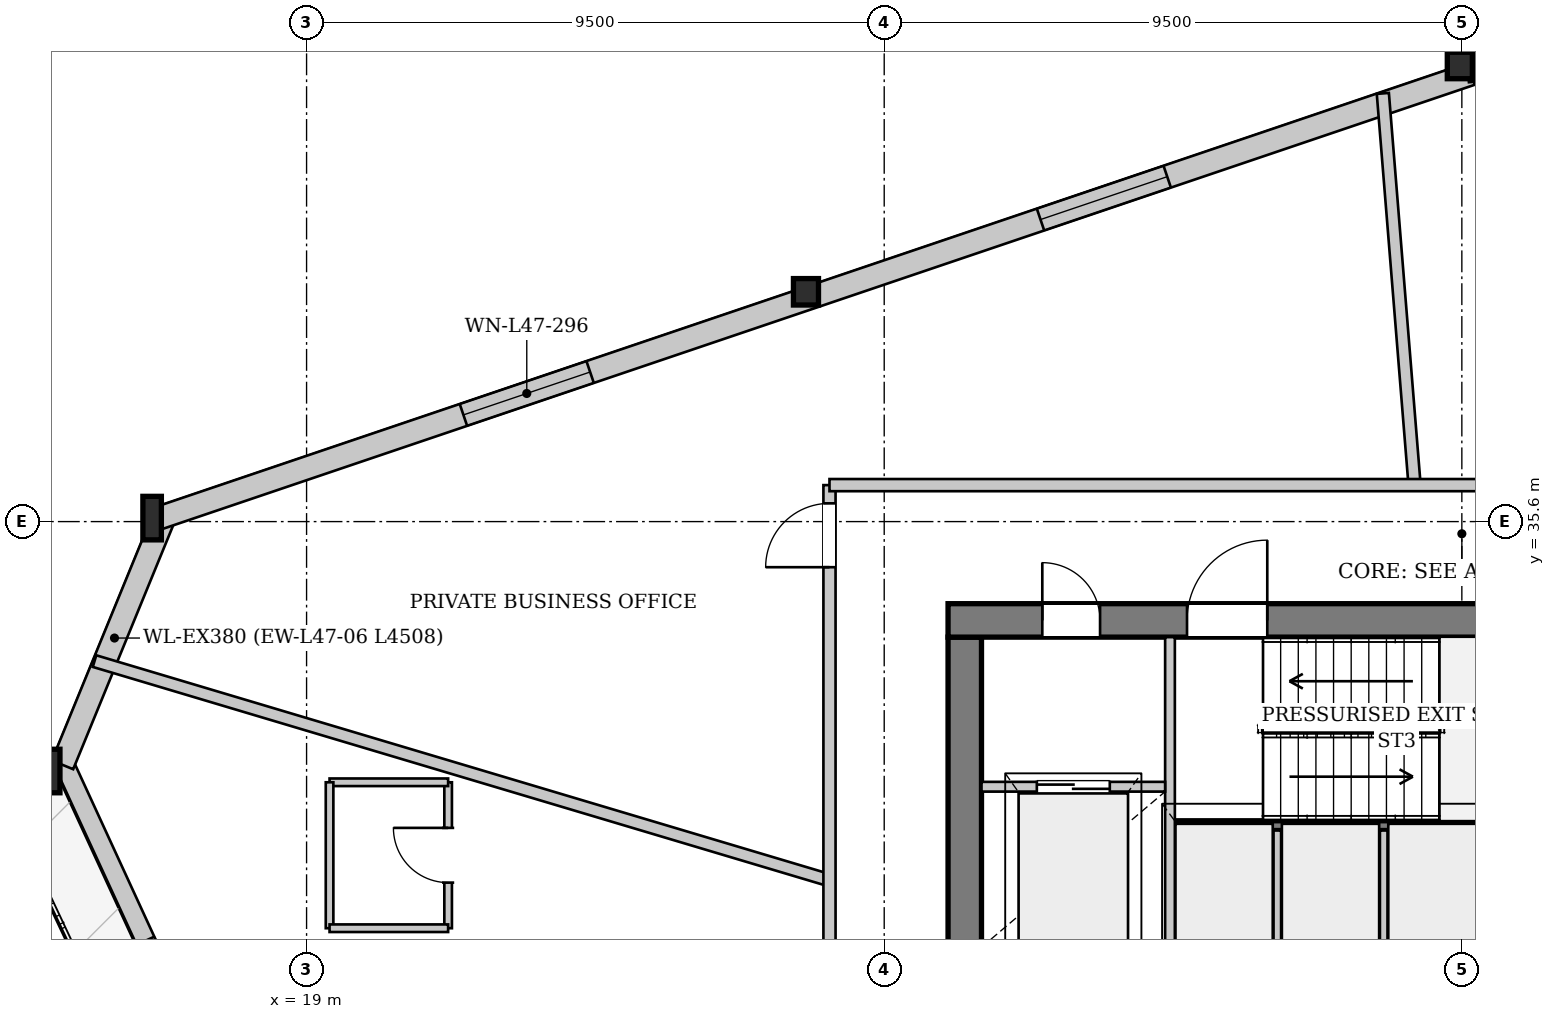
"""IFC4 building model, lengths in metres.
Left out: names, types, materials, properties, quantities, classifications, styles, units other than length and angle.
Written with IfcOpenShell. Run it as: python <this file> out.ifc"""

import sys

from ifc_helpers import new_model, si_unit, direction, frame, frame_2d, origin, origin_2d, place, context, subcontext, project, spatial, rectangle, i_section, extrude, source, transform, mapped, element, fill, save


model = new_model("IFC4")
c1 = context("Model", 3, precision=1e-05, world=origin(), true_north=direction((0.0, 1.0)))
c2 = subcontext(c1, "Body", "Model", "MODEL_VIEW")
j1 = project(units=[si_unit("LENGTHUNIT", "METRE"), si_unit("PLANEANGLEUNIT", "RADIAN")], contexts=[c1])
p1 = place(None, origin())
s1 = spatial("IfcSite", under=j1, at=p1, CompositionType="ELEMENT")
p2 = place(p1, origin())
s2 = spatial("IfcBuilding", under=s1, at=p2, CompositionType="ELEMENT")
p3 = place(p2, frame((0.0, 0.0, 178.55)))
s3 = spatial("IfcBuildingStorey", under=s2, at=p3, CompositionType="ELEMENT", Elevation=178.55)
m1 = source(origin(), c2, "Body", "SweptSolid", [
    extrude(i_section(OverallWidth=0.412, OverallDepth=0.435, WebThickness=0.031, FlangeThickness=0.05, at=origin_2d()), origin(), (0.0, 0.0, 1.0), 3.395),
])
p4 = place(p3, frame((38.092, 43.144, 0.0), z_axis=(-0.07370194171, -0.025526038348, 0.996953582247), x_axis=(0.327268874933, -0.944931258611, 0.0)))
e1 = element("IfcColumn", 1, at=p4, inside=s3, PredefinedType="COLUMN", context=c2, shape_type="MappedRepresentation", body=[
    mapped(m1, transform((0.0, 0.0, 0.0), x_axis=(1.0, 0.0, 0.0), y_axis=(0.0, 1.0, 0.0), z_axis=(0.0, 0.0, 1.0), scale=1.0)),
])
m2 = source(origin(), c2, "Body", "SweptSolid", [
    extrude(i_section(OverallWidth=0.412, OverallDepth=0.435, WebThickness=0.031, FlangeThickness=0.05, at=origin_2d()), origin(), (0.0, 0.0, 1.0), 3.398),
])
p5 = place(p3, frame((27.306, 39.493, 0.0), z_axis=(-0.054536558133, -0.067254569714, 0.996244240475), x_axis=(0.776722832327, -0.629842553137, 0.0)))
e2 = element("IfcColumn", 2, at=p5, inside=s3, PredefinedType="COLUMN", context=c2, shape_type="MappedRepresentation", body=[
    mapped(m2, transform((0.0, 0.0, 0.0), x_axis=(1.0, 0.0, 0.0), y_axis=(0.0, 1.0, 0.0), z_axis=(0.0, 0.0, 1.0), scale=1.0)),
])
m3 = source(origin(), c2, "Body", "SweptSolid", [
    extrude(i_section(OverallWidth=0.304, OverallDepth=0.716, WebThickness=0.021, FlangeThickness=0.04, at=origin_2d()), origin(), (0.0, 0.0, 1.0), 3.407),
])
p6 = place(p3, frame((16.52, 35.843, 0.0), z_axis=(-0.035467286083, -0.108694692905, 0.993442265737), x_axis=(0.950669589838, -0.310205304528, 0.0)))
e3 = element("IfcColumn", 3, at=p6, inside=s3, PredefinedType="COLUMN", context=c2, shape_type="MappedRepresentation", body=[
    mapped(m3, transform((0.0, 0.0, 0.0), x_axis=(1.0, 0.0, 0.0), y_axis=(0.0, 1.0, 0.0), z_axis=(0.0, 0.0, 1.0), scale=1.0)),
])
m4 = source(origin(), c2, "Body", "SweptSolid", [
    extrude(i_section(OverallWidth=0.304, OverallDepth=0.716, WebThickness=0.021, FlangeThickness=0.04, at=origin_2d()), origin(), (0.0, 0.0, 1.0), 3.403),
])
p7 = place(p3, frame((14.81, 31.672, 0.0), z_axis=(-0.010402853053, -0.102019703729, 0.994727983269), x_axis=(0.994841349494, -0.101443034934, 0.0)))
e4 = element("IfcColumn", 4, at=p7, inside=s3, PredefinedType="COLUMN", context=c2, shape_type="MappedRepresentation", body=[
    mapped(m4, transform((0.0, 0.0, 0.0), x_axis=(1.0, 0.0, 0.0), y_axis=(0.0, 1.0, 0.0), z_axis=(0.0, 0.0, 1.0), scale=1.0)),
])
p8 = place(p3, frame((22.411, 15.536, 0.0), z_axis=(0.0, 0.0, 1.0), x_axis=(-0.418042306269, 0.90842755912, 0.0)))
e5 = element("IfcWall", 5, at=p8, inside=s3, PredefinedType="SOLIDWALL", context=c2, shape_type="SweptSolid", body=[
    extrude(rectangle(XDim=17.836, YDim=0.32, at=frame_2d((8.918, 0.0))), origin(), (0.0, 0.0, 1.0), 2.722),
])
p9 = place(p8, frame((5.707, 0.0, 0.0)))
e6 = element("IfcOpeningElement", 6, at=p9, cuts=e5, PredefinedType="OPENING", context=c2, shape_type="SweptSolid", body=[
    extrude(rectangle(XDim=1.5, YDim=2.3, at=frame_2d((0.75, 1.15))), frame((0.0, 0.17, 0.0), z_axis=(0.0, -1.0, 0.0), x_axis=(1.0, 0.0, 0.0)), (0.0, 0.0, 1.0), 0.34),
])
p10 = place(p8, frame((11.898, 0.0, 0.252)))
e7 = element("IfcOpeningElement", 7, at=p10, cuts=e5, PredefinedType="OPENING", context=c2, shape_type="SweptSolid", body=[
    extrude(rectangle(XDim=2.6, YDim=2.35, at=frame_2d((1.3, 1.175))), frame((0.0, 0.17, 0.0), z_axis=(0.0, -1.0, 0.0), x_axis=(1.0, 0.0, 0.0)), (0.0, 0.0, 1.0), 0.34),
])
p11 = place(p3, frame((14.986, 31.6, 0.0), z_axis=(0.0, 0.0, 1.0), x_axis=(0.379425607081, 0.925222248269, 0.0)))
e8 = element("IfcWall", 8, at=p11, inside=s3, PredefinedType="SOLIDWALL", context=c2, shape_type="SweptSolid", body=[
    extrude(rectangle(XDim=4.508, YDim=0.38, at=frame_2d((2.254, 0.0))), origin(), (0.0, 0.0, 1.0), 2.722),
])
p12 = place(p3, frame((16.581, 35.663, 0.0), z_axis=(0.0, 0.0, 1.0), x_axis=(0.947210910962, 0.320611119822, 0.0)))
e9 = element("IfcWall", 9, at=p12, inside=s3, PredefinedType="SOLIDWALL", context=c2, shape_type="SweptSolid", body=[
    extrude(rectangle(XDim=22.774, YDim=0.38, at=frame_2d((11.387, 0.0))), origin(), (0.0, 0.0, 1.0), 2.722),
])
p13 = place(p12, frame((5.277, 0.0, 0.352)))
e10 = element("IfcOpeningElement", 10, at=p13, cuts=e9, PredefinedType="OPENING", context=c2, shape_type="SweptSolid", body=[
    extrude(rectangle(XDim=2.2, YDim=2.25, at=frame_2d((1.1, 1.125))), frame((0.0, 0.2, 0.0), z_axis=(0.0, -1.0, 0.0), x_axis=(1.0, 0.0, 0.0)), (0.0, 0.0, 1.0), 0.4),
])
p14 = place(p12, frame((15.297, 0.0, 0.352)))
e11 = element("IfcOpeningElement", 11, at=p14, cuts=e9, PredefinedType="OPENING", context=c2, shape_type="SweptSolid", body=[
    extrude(rectangle(XDim=2.2, YDim=2.25, at=frame_2d((1.1, 1.125))), frame((0.0, 0.2, 0.0), z_axis=(0.0, -1.0, 0.0), x_axis=(1.0, 0.0, 0.0)), (0.0, 0.0, 1.0), 0.4),
])
p15 = place(p3, frame((38.104, 42.985, 0.0), z_axis=(0.0, 0.0, 1.0), x_axis=(0.997043186839, 0.076843240291, 0.0)))
e12 = element("IfcWall", 12, at=p15, inside=s3, PredefinedType="SOLIDWALL", context=c2, shape_type="SweptSolid", body=[
    extrude(rectangle(XDim=22.774, YDim=0.32, at=frame_2d((11.387, 0.0))), origin(), (0.0, 0.0, 1.0), 2.722),
])
p16 = place(p15, frame((6.538, 0.0, 0.0)))
e13 = element("IfcOpeningElement", 13, at=p16, cuts=e12, PredefinedType="OPENING", context=c2, shape_type="SweptSolid", body=[
    extrude(rectangle(XDim=1.5, YDim=2.3, at=frame_2d((0.75, 1.15))), frame((0.0, 0.17, 0.0), z_axis=(0.0, -1.0, 0.0), x_axis=(1.0, 0.0, 0.0)), (0.0, 0.0, 1.0), 0.34),
])
p17 = place(p15, frame((15.553, 0.0, 0.252)))
e14 = element("IfcOpeningElement", 14, at=p17, cuts=e12, PredefinedType="OPENING", context=c2, shape_type="SweptSolid", body=[
    extrude(rectangle(XDim=2.6, YDim=2.35, at=frame_2d((1.3, 1.175))), frame((0.0, 0.17, 0.0), z_axis=(0.0, -1.0, 0.0), x_axis=(1.0, 0.0, 0.0)), (0.0, 0.0, 1.0), 0.34),
])
p18 = place(p3, frame((29.825, 19.5, 0.0), z_axis=(0.0, 0.0, 1.0), x_axis=(0.0, 1.0, 0.0)))
e15 = element("IfcWall", 15, at=p18, inside=s3, PredefinedType="SHEAR", context=c2, shape_type="SweptSolid", body=[
    extrude(rectangle(XDim=14.2, YDim=0.55, at=frame_2d((7.1, 0.0))), origin(), (0.0, 0.0, 1.0), 3.33),
])
p19 = place(p18, frame((7.42, 0.0, 0.0)))
e16 = element("IfcOpeningElement", 16, at=p19, cuts=e15, PredefinedType="OPENING", context=c2, shape_type="SweptSolid", body=[
    extrude(rectangle(XDim=1.6, YDim=2.2, at=frame_2d((0.8, 1.1))), frame((0.0, 0.285, 0.0), z_axis=(0.0, -1.0, 0.0), x_axis=(1.0, 0.0, 0.0)), (0.0, 0.0, 1.0), 0.57),
])
p20 = place(p3, frame((29.55, 33.975, 0.0), z_axis=(0.0, 0.0, 1.0), x_axis=(1.0, 0.0, 0.0)))
e17 = element("IfcWall", 17, at=p20, inside=s3, PredefinedType="SHEAR", context=c2, shape_type="SweptSolid", body=[
    extrude(rectangle(XDim=16.9, YDim=0.55, at=frame_2d((8.45, 0.0))), origin(), (0.0, 0.0, 1.0), 3.33),
])
p21 = place(p20, frame((1.55, 0.0, 0.0)))
e18 = element("IfcOpeningElement", 18, at=p21, cuts=e17, PredefinedType="OPENING", context=c2, shape_type="SweptSolid", body=[
    extrude(rectangle(XDim=0.95, YDim=2.1, at=frame_2d((0.475, 1.05))), frame((0.0, 0.285, 0.0), z_axis=(0.0, -1.0, 0.0), x_axis=(1.0, 0.0, 0.0)), (0.0, 0.0, 1.0), 0.57),
])
p22 = place(p20, frame((3.93, 0.0, 0.0)))
e19 = element("IfcOpeningElement", 19, at=p22, cuts=e17, PredefinedType="OPENING", context=c2, shape_type="SweptSolid", body=[
    extrude(rectangle(XDim=1.32, YDim=2.2, at=frame_2d((0.66, 1.1))), frame((0.0, 0.285, 0.0), z_axis=(0.0, -1.0, 0.0), x_axis=(1.0, 0.0, 0.0)), (0.0, 0.0, 1.0), 0.57),
])
p23 = place(p3, frame((33.28, 30.6, 0.0), z_axis=(0.0, 0.0, 1.0), x_axis=(1.0, 0.0, 0.0)))
e20 = element("IfcWall", 20, at=p23, inside=s3, PredefinedType="PARTITIONING", context=c2, shape_type="SweptSolid", body=[
    extrude(rectangle(XDim=7.3, YDim=0.16, at=frame_2d((3.65, 0.0))), origin(), (0.0, 0.0, 1.0), 3.33),
])
p24 = place(p3, frame((33.2, 28.44, 0.0), z_axis=(0.0, 0.0, 1.0), x_axis=(0.0, 1.0, 0.0)))
e21 = element("IfcWall", 21, at=p24, inside=s3, PredefinedType="PARTITIONING", context=c2, shape_type="SweptSolid", body=[
    extrude(rectangle(XDim=5.26, YDim=0.16, at=frame_2d((2.63, 0.0))), origin(), (0.0, 0.0, 1.0), 3.33),
])
p25 = place(p3, frame((30.1, 31.24, 0.0), z_axis=(0.0, 0.0, 1.0), x_axis=(1.0, 0.0, 0.0)))
e22 = element("IfcWall", 22, at=p25, inside=s3, PredefinedType="PARTITIONING", context=c2, shape_type="SweptSolid", body=[
    extrude(rectangle(XDim=3.02, YDim=0.16, at=frame_2d((1.51, 0.0))), origin(), (0.0, 0.0, 1.0), 3.33),
])
p26 = place(p25, frame((0.91, 0.0, 0.0)))
e23 = element("IfcOpeningElement", 23, at=p26, cuts=e22, PredefinedType="OPENING", context=c2, shape_type="SweptSolid", body=[
    extrude(rectangle(XDim=1.2, YDim=2.2, at=frame_2d((0.6, 1.1))), frame((0.0, 0.09, 0.0), z_axis=(0.0, -1.0, 0.0), x_axis=(1.0, 0.0, 0.0)), (0.0, 0.0, 1.0), 0.18),
])
for number, where, z_axis, x_axis in (
    (24, (34.965, 28.6, 0.0), (0.0, 0.0, 1.0), (0.0, 1.0, 0.0)),
    (25, (36.715, 28.6, 0.0), (0.0, 0.0, 1.0), (0.0, 1.0, 0.0)),
):
    element("IfcWall", number, at=place(p3, frame(where, z_axis=z_axis, x_axis=x_axis)), inside=s3, PredefinedType="PARTITIONING", context=c2, shape_type="SweptSolid", body=[
        extrude(rectangle(XDim=1.92, YDim=0.125, at=frame_2d((0.96, 0.0))), origin(), (0.0, 0.0, 1.0), 3.33),
    ])
p27 = place(p3, frame((37.222, 36.2, 0.0), z_axis=(0.0, 0.0, 1.0), x_axis=(-0.080766167067, 0.996733076735, 0.0)))
e26 = element("IfcWall", 26, at=p27, inside=s3, PredefinedType="PARTITIONING", context=c2, shape_type="SweptSolid", body=[
    extrude(rectangle(XDim=6.463, YDim=0.2, at=frame_2d((3.231, 0.0))), origin(), (0.0, 0.0, 1.0), 3.33),
])
p28 = place(p3, frame((27.6, 29.701, 0.0), z_axis=(0.0, 0.0, 1.0), x_axis=(-0.958300687038, 0.285761777048, 0.0)))
e27 = element("IfcWall", 27, at=p28, inside=s3, PredefinedType="PARTITIONING", context=c2, shape_type="SweptSolid", body=[
    extrude(rectangle(XDim=12.614, YDim=0.2, at=frame_2d((6.307, 0.0))), origin(), (0.0, 0.0, 1.0), 3.33),
])
p29 = place(p3, frame((21.328, 28.913, 0.0), z_axis=(0.0, 0.0, 1.0), x_axis=(0.0, 1.0, 0.0)))
e28 = element("IfcWall", 28, at=p29, inside=s3, PredefinedType="PARTITIONING", context=c2, shape_type="SweptSolid", body=[
    extrude(rectangle(XDim=2.4, YDim=0.125, at=frame_2d((1.2, 0.0))), origin(), (0.0, 0.0, 1.0), 2.955),
])
p30 = place(p29, frame((0.75, 0.0, 0.0)))
e29 = element("IfcOpeningElement", 29, at=p30, cuts=e28, PredefinedType="OPENING", context=c2, shape_type="SweptSolid", body=[
    extrude(rectangle(XDim=0.9, YDim=2.1, at=frame_2d((0.45, 1.05))), frame((0.0, 0.073, 0.0), z_axis=(0.0, -1.0, 0.0), x_axis=(1.0, 0.0, 0.0)), (0.0, 0.0, 1.0), 0.145),
])
p31 = place(p3, frame((21.328, 31.313, 0.0), z_axis=(0.0, 0.0, 1.0), x_axis=(-1.0, 0.0, 0.0)))
e30 = element("IfcWall", 30, at=p31, inside=s3, PredefinedType="PARTITIONING", context=c2, shape_type="SweptSolid", body=[
    extrude(rectangle(XDim=1.95, YDim=0.125, at=frame_2d((0.975, 0.0))), origin(), (0.0, 0.0, 1.0), 3.33),
])
p32 = place(p3, frame((19.378, 31.313, 0.0), z_axis=(0.0, 0.0, 1.0), x_axis=(0.0, -1.0, 0.0)))
e31 = element("IfcWall", 31, at=p32, inside=s3, PredefinedType="PARTITIONING", context=c2, shape_type="SweptSolid", body=[
    extrude(rectangle(XDim=2.4, YDim=0.125, at=frame_2d((1.2, 0.0))), origin(), (0.0, 0.0, 1.0), 3.33),
])
p33 = place(p3, frame((19.378, 28.913, 0.0), z_axis=(0.0, 0.0, 1.0), x_axis=(1.0, 0.0, 0.0)))
e32 = element("IfcWall", 32, at=p33, inside=s3, PredefinedType="PARTITIONING", context=c2, shape_type="SweptSolid", body=[
    extrude(rectangle(XDim=1.95, YDim=0.125, at=frame_2d((0.975, 0.0))), origin(), (0.0, 0.0, 1.0), 3.33),
])
p34 = place(p3, frame((27.6, 17.0, 0.0), z_axis=(0.0, 0.0, 1.0), x_axis=(0.0, 1.0, 0.0)))
e33 = element("IfcWall", 33, at=p34, inside=s3, PredefinedType="PARTITIONING", context=c2, shape_type="SweptSolid", body=[
    extrude(rectangle(XDim=19.2, YDim=0.2, at=frame_2d((9.6, 0.0))), origin(), (0.0, 0.0, 1.0), 3.33),
])
p35 = place(p34, frame((0.3, 0.0, 0.0)))
e34 = element("IfcOpeningElement", 34, at=p35, cuts=e33, PredefinedType="OPENING", context=c2, shape_type="SweptSolid", body=[
    extrude(rectangle(XDim=1.05, YDim=2.2, at=frame_2d((0.525, 1.1))), frame((0.0, 0.11, 0.0), z_axis=(0.0, -1.0, 0.0), x_axis=(1.0, 0.0, 0.0)), (0.0, 0.0, 1.0), 0.22),
])
p36 = place(p34, frame((17.85, 0.0, 0.0)))
e35 = element("IfcOpeningElement", 35, at=p36, cuts=e33, PredefinedType="OPENING", context=c2, shape_type="SweptSolid", body=[
    extrude(rectangle(XDim=1.05, YDim=2.2, at=frame_2d((0.525, 1.1))), frame((0.0, 0.11, 0.0), z_axis=(0.0, -1.0, 0.0), x_axis=(1.0, 0.0, 0.0)), (0.0, 0.0, 1.0), 0.22),
])
p37 = place(p34, frame((8.301, 0.0, 0.0)))
e36 = element("IfcOpeningElement", 36, at=p37, cuts=e33, PredefinedType="OPENING", context=c2, shape_type="SweptSolid", body=[
    extrude(rectangle(XDim=1.05, YDim=2.2, at=frame_2d((0.525, 1.1))), frame((0.0, 0.11, 0.0), z_axis=(0.0, -1.0, 0.0), x_axis=(1.0, 0.0, 0.0)), (0.0, 0.0, 1.0), 0.22),
])
p38 = place(p3, frame((27.6, 36.2, 0.0), z_axis=(0.0, 0.0, 1.0), x_axis=(1.0, 0.0, 0.0)))
e37 = element("IfcWall", 37, at=p38, inside=s3, PredefinedType="PARTITIONING", context=c2, shape_type="SweptSolid", body=[
    extrude(rectangle(XDim=13.4, YDim=0.2, at=frame_2d((6.7, 0.0))), origin(), (0.0, 0.0, 1.0), 3.33),
])
p39 = place(p38, frame((11.874, 0.0, 0.0)))
e38 = element("IfcOpeningElement", 38, at=p39, cuts=e37, PredefinedType="OPENING", context=c2, shape_type="SweptSolid", body=[
    extrude(rectangle(XDim=1.05, YDim=2.2, at=frame_2d((0.525, 1.1))), frame((0.0, 0.11, 0.0), z_axis=(0.0, -1.0, 0.0), x_axis=(1.0, 0.0, 0.0)), (0.0, 0.0, 1.0), 0.22),
])
m5 = source(origin(), c2, "Body", "SweptSolid", [
    extrude(rectangle(XDim=2.2, YDim=2.25, at=frame_2d((1.1, 1.125))), frame((0.0, 0.03, 0.0), z_axis=(0.0, -1.0, 0.0), x_axis=(1.0, 0.0, 0.0)), (0.0, 0.0, 1.0), 0.06),
])
p40 = place(p13, origin())
e39 = element("IfcWindow", 39, at=p40, inside=s3, PartitioningType="SINGLE_PANEL", PredefinedType="WINDOW", context=c2, shape_type="MappedRepresentation", body=[
    mapped(m5, transform((0.0, 0.0, 0.0), x_axis=(1.0, 0.0, 0.0), y_axis=(0.0, 1.0, 0.0), z_axis=(0.0, 0.0, 1.0), scale=1.0)),
])
fill(e10, e39)
p41 = place(p14, origin())
e40 = element("IfcWindow", 40, at=p41, inside=s3, PartitioningType="SINGLE_PANEL", PredefinedType="WINDOW", context=c2, shape_type="MappedRepresentation", body=[
    mapped(m5, transform((0.0, 0.0, 0.0), x_axis=(1.0, 0.0, 0.0), y_axis=(0.0, 1.0, 0.0), z_axis=(0.0, 0.0, 1.0), scale=1.0)),
])
fill(e11, e40)
m6 = source(origin(), c2, "Body", "SweptSolid", [
    extrude(rectangle(XDim=0.95, YDim=2.1, at=frame_2d((0.475, 1.05))), frame((0.0, 0.025, 0.0), z_axis=(0.0, -1.0, 0.0), x_axis=(1.0, 0.0, 0.0)), (0.0, 0.0, 1.0), 0.05),
])
p42 = place(p21, origin())
e41 = element("IfcDoor", 41, at=p42, inside=s3, OperationType="SINGLE_SWING_LEFT", PredefinedType="DOOR", context=c2, shape_type="MappedRepresentation", body=[
    mapped(m6, transform((0.0, 0.0, 0.0), x_axis=(1.0, 0.0, 0.0), y_axis=(0.0, 1.0, 0.0), z_axis=(0.0, 0.0, 1.0), scale=1.0)),
])
fill(e18, e41)
m7 = source(origin(), c2, "Body", "SweptSolid", [
    extrude(rectangle(XDim=1.32, YDim=2.2, at=frame_2d((0.66, 1.1))), frame((0.0, 0.025, 0.0), z_axis=(0.0, -1.0, 0.0), x_axis=(1.0, 0.0, 0.0)), (0.0, 0.0, 1.0), 0.05),
])
p43 = place(p22, origin())
e42 = element("IfcDoor", 42, at=p43, inside=s3, OperationType="SINGLE_SWING_RIGHT", PredefinedType="DOOR", context=c2, shape_type="MappedRepresentation", body=[
    mapped(m7, transform((0.0, 0.0, 0.0), x_axis=(1.0, 0.0, 0.0), y_axis=(0.0, 1.0, 0.0), z_axis=(0.0, 0.0, 1.0), scale=1.0)),
])
fill(e19, e42)
m8 = source(origin(), c2, "Body", "SweptSolid", [
    extrude(rectangle(XDim=1.2, YDim=2.2, at=frame_2d((0.6, 1.1))), frame((0.0, 0.025, 0.0), z_axis=(0.0, -1.0, 0.0), x_axis=(1.0, 0.0, 0.0)), (0.0, 0.0, 1.0), 0.05),
])
p44 = place(p26, origin())
e43 = element("IfcDoor", 43, at=p44, inside=s3, OperationType="DOUBLE_DOOR_SLIDING", PredefinedType="DOOR", context=c2, shape_type="MappedRepresentation", body=[
    mapped(m8, transform((0.0, 0.0, 0.0), x_axis=(1.0, 0.0, 0.0), y_axis=(0.0, 1.0, 0.0), z_axis=(0.0, 0.0, 1.0), scale=1.0)),
])
fill(e23, e43)
m9 = source(origin(), c2, "Body", "SweptSolid", [
    extrude(rectangle(XDim=0.9, YDim=2.1, at=frame_2d((0.45, 1.05))), frame((0.0, 0.025, 0.0), z_axis=(0.0, -1.0, 0.0), x_axis=(1.0, 0.0, 0.0)), (0.0, 0.0, 1.0), 0.05),
])
p45 = place(p30, origin())
e44 = element("IfcDoor", 44, at=p45, inside=s3, OperationType="SINGLE_SWING_RIGHT", PredefinedType="DOOR", context=c2, shape_type="MappedRepresentation", body=[
    mapped(m9, transform((0.0, 0.0, 0.0), x_axis=(1.0, 0.0, 0.0), y_axis=(0.0, 1.0, 0.0), z_axis=(0.0, 0.0, 1.0), scale=1.0)),
])
fill(e29, e44)
m10 = source(origin(), c2, "Body", "SweptSolid", [
    extrude(rectangle(XDim=1.05, YDim=2.2, at=frame_2d((0.525, 1.1))), frame((0.0, 0.025, 0.0), z_axis=(0.0, -1.0, 0.0), x_axis=(1.0, 0.0, 0.0)), (0.0, 0.0, 1.0), 0.05),
])
p46 = place(p36, origin())
e45 = element("IfcDoor", 45, at=p46, inside=s3, OperationType="SINGLE_SWING_LEFT", PredefinedType="DOOR", context=c2, shape_type="MappedRepresentation", body=[
    mapped(m10, transform((0.0, 0.0, 0.0), x_axis=(1.0, 0.0, 0.0), y_axis=(0.0, 1.0, 0.0), z_axis=(0.0, 0.0, 1.0), scale=1.0)),
])
fill(e35, e45)
save(model, sys.argv[1])
